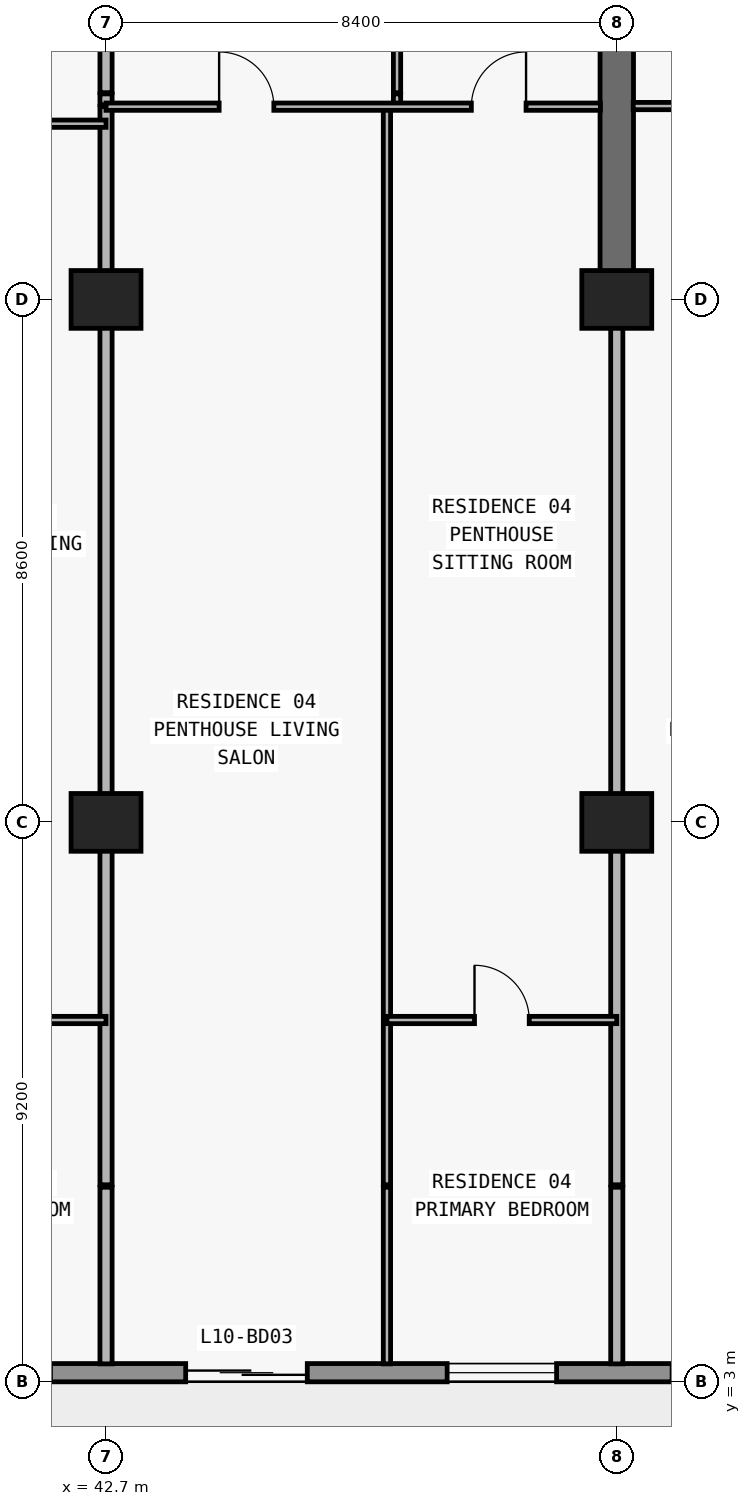
"""IFC4 building model, lengths in metres.
Left out: names, types, materials, properties, quantities, classifications, styles, units other than length and angle.
Written with IfcOpenShell. Run it as: python <this file> out.ifc"""

import sys

from ifc_helpers import new_model, si_unit, direction, frame, frame_2d, origin, origin_2d, place, context, subcontext, project, spatial, rectangle, extrude, element, fill, save


model = new_model("IFC4")
c1 = context("Model", 3, precision=1e-05, world=origin(), true_north=direction((0.0, 1.0)))
c2 = subcontext(c1, "Body", "Model", "MODEL_VIEW")
j1 = project(units=[si_unit("LENGTHUNIT", "METRE"), si_unit("PLANEANGLEUNIT", "RADIAN")], contexts=[c1])
p1 = place(None, origin())
s1 = spatial("IfcSite", under=j1, at=p1, CompositionType="ELEMENT")
p2 = place(p1, origin())
s2 = spatial("IfcBuilding", under=s1, at=p2, CompositionType="ELEMENT")
p3 = place(p2, frame((0.0, 0.0, 43.2)))
s3 = spatial("IfcBuildingStorey", under=s2, at=p3, CompositionType="ELEMENT", Elevation=43.2)
for number, where, z_axis, x_axis in (
    (1, (42.7, 12.2, 0.0), (0.0, 0.0, 1.0), (1.0, 0.0, 0.0)),
    (2, (51.1, 12.2, 0.0), (0.0, 0.0, 1.0), (1.0, 0.0, 0.0)),
    (3, (42.7, 20.8, 0.0), (0.0, 0.0, 1.0), (1.0, 0.0, 0.0)),
    (4, (51.1, 20.8, 0.0), (0.0, 0.0, 1.0), (1.0, 0.0, 0.0)),
):
    element("IfcColumn", number, at=place(p3, frame(where, z_axis=z_axis, x_axis=x_axis)), inside=s3, PredefinedType="COLUMN", context=c2, shape_type="SweptSolid", body=[
        extrude(rectangle(XDim=1.15, YDim=0.95, at=origin_2d()), origin(), (0.0, 0.0, 1.0), 3.05),
    ])
p4 = place(p3, frame((51.1, 20.8, 0.0), z_axis=(0.0, 0.0, 1.0), x_axis=(0.0, 1.0, 0.0)))
e5 = element("IfcWall", 5, at=p4, inside=s3, PredefinedType="SHEAR", context=c2, shape_type="SweptSolid", body=[
    extrude(rectangle(XDim=8.6, YDim=0.55, at=frame_2d((4.3, 0.0))), origin(), (0.0, 0.0, 1.0), 3.05),
])
p5 = place(p3, frame((72.7, 3.15, 0.0), z_axis=(0.0, 0.0, 1.0), x_axis=(-1.0, 0.0, 0.0)))
e6 = element("IfcWall", 6, at=p5, inside=s3, PredefinedType="STANDARD", context=c2, shape_type="SweptSolid", body=[
    extrude(rectangle(XDim=67.6, YDim=0.3, at=frame_2d((33.8, 0.0))), origin(), (0.0, 0.0, 1.0), 3.05),
])
p6 = place(p5, frame((59.89, 0.0, 0.0)))
e7 = element("IfcOpeningElement", 7, at=p6, cuts=e6, PredefinedType="OPENING", context=c2, shape_type="SweptSolid", body=[
    extrude(rectangle(XDim=2.0, YDim=2.3, at=frame_2d((1.0, 1.15))), frame((0.0, 0.16, 0.0), z_axis=(0.0, -1.0, 0.0), x_axis=(1.0, 0.0, 0.0)), (0.0, 0.0, 1.0), 0.32),
])
p7 = place(p5, frame((55.21, 0.0, 0.65)))
e8 = element("IfcOpeningElement", 8, at=p7, cuts=e6, PredefinedType="OPENING", context=c2, shape_type="SweptSolid", body=[
    extrude(rectangle(XDim=2.6, YDim=1.85, at=frame_2d((1.3, 0.925))), frame((0.0, 0.16, 0.0), z_axis=(0.0, -1.0, 0.0), x_axis=(1.0, 0.0, 0.0)), (0.0, 0.0, 1.0), 0.32),
])
p8 = place(p5, frame((49.1, 0.0, 0.85)))
e9 = element("IfcOpeningElement", 9, at=p8, cuts=e6, PredefinedType="OPENING", context=c2, shape_type="SweptSolid", body=[
    extrude(rectangle(XDim=2.2, YDim=1.55, at=frame_2d((1.1, 0.775))), frame((0.0, 0.16, 0.0), z_axis=(0.0, -1.0, 0.0), x_axis=(1.0, 0.0, 0.0)), (0.0, 0.0, 1.0), 0.32),
])
p9 = place(p5, frame((42.69, 0.0, 0.0)))
e10 = element("IfcOpeningElement", 10, at=p9, cuts=e6, PredefinedType="OPENING", context=c2, shape_type="SweptSolid", body=[
    extrude(rectangle(XDim=2.0, YDim=2.3, at=frame_2d((1.0, 1.15))), frame((0.0, 0.16, 0.0), z_axis=(0.0, -1.0, 0.0), x_axis=(1.0, 0.0, 0.0)), (0.0, 0.0, 1.0), 0.32),
])
p10 = place(p5, frame((38.59, 0.0, 0.85)))
e11 = element("IfcOpeningElement", 11, at=p10, cuts=e6, PredefinedType="OPENING", context=c2, shape_type="SweptSolid", body=[
    extrude(rectangle(XDim=1.8, YDim=1.55, at=frame_2d((0.9, 0.775))), frame((0.0, 0.16, 0.0), z_axis=(0.0, -1.0, 0.0), x_axis=(1.0, 0.0, 0.0)), (0.0, 0.0, 1.0), 0.32),
])
p11 = place(p5, frame((30.914, 0.0, 0.85)))
e12 = element("IfcOpeningElement", 12, at=p11, cuts=e6, PredefinedType="OPENING", context=c2, shape_type="SweptSolid", body=[
    extrude(rectangle(XDim=2.2, YDim=1.55, at=frame_2d((1.1, 0.775))), frame((0.0, 0.16, 0.0), z_axis=(0.0, -1.0, 0.0), x_axis=(1.0, 0.0, 0.0)), (0.0, 0.0, 1.0), 0.32),
])
p12 = place(p5, frame((26.69, 0.0, 0.0)))
e13 = element("IfcOpeningElement", 13, at=p12, cuts=e6, PredefinedType="OPENING", context=c2, shape_type="SweptSolid", body=[
    extrude(rectangle(XDim=2.0, YDim=2.3, at=frame_2d((1.0, 1.15))), frame((0.0, 0.16, 0.0), z_axis=(0.0, -1.0, 0.0), x_axis=(1.0, 0.0, 0.0)), (0.0, 0.0, 1.0), 0.32),
])
p13 = place(p5, frame((22.59, 0.0, 0.85)))
e14 = element("IfcOpeningElement", 14, at=p13, cuts=e6, PredefinedType="OPENING", context=c2, shape_type="SweptSolid", body=[
    extrude(rectangle(XDim=1.8, YDim=1.55, at=frame_2d((0.9, 0.775))), frame((0.0, 0.16, 0.0), z_axis=(0.0, -1.0, 0.0), x_axis=(1.0, 0.0, 0.0)), (0.0, 0.0, 1.0), 0.32),
])
p14 = place(p5, frame((18.69, 0.0, 0.0)))
e15 = element("IfcOpeningElement", 15, at=p14, cuts=e6, PredefinedType="OPENING", context=c2, shape_type="SweptSolid", body=[
    extrude(rectangle(XDim=2.0, YDim=2.3, at=frame_2d((1.0, 1.15))), frame((0.0, 0.16, 0.0), z_axis=(0.0, -1.0, 0.0), x_axis=(1.0, 0.0, 0.0)), (0.0, 0.0, 1.0), 0.32),
])
p15 = place(p5, frame((14.01, 0.0, 0.65)))
e16 = element("IfcOpeningElement", 16, at=p15, cuts=e6, PredefinedType="OPENING", context=c2, shape_type="SweptSolid", body=[
    extrude(rectangle(XDim=2.6, YDim=1.85, at=frame_2d((1.3, 0.925))), frame((0.0, 0.16, 0.0), z_axis=(0.0, -1.0, 0.0), x_axis=(1.0, 0.0, 0.0)), (0.0, 0.0, 1.0), 0.32),
])
p16 = place(p5, frame((7.9, 0.0, 0.85)))
e17 = element("IfcOpeningElement", 17, at=p16, cuts=e6, PredefinedType="OPENING", context=c2, shape_type="SweptSolid", body=[
    extrude(rectangle(XDim=2.2, YDim=1.55, at=frame_2d((1.1, 0.775))), frame((0.0, 0.16, 0.0), z_axis=(0.0, -1.0, 0.0), x_axis=(1.0, 0.0, 0.0)), (0.0, 0.0, 1.0), 0.32),
])
p17 = place(p3, frame((42.7, 3.295, 0.0), z_axis=(0.0, 0.0, 1.0), x_axis=(0.0, 1.0, 0.0)))
e18 = element("IfcWall", 18, at=p17, inside=s3, PredefinedType="PARTITIONING", context=c2, shape_type="SweptSolid", body=[
    extrude(rectangle(XDim=2.905, YDim=0.2, at=frame_2d((1.453, 0.0))), origin(), (0.0, 0.0, 1.0), 3.05),
])
p18 = place(p3, frame((42.7, 6.24, 0.0), z_axis=(0.0, 0.0, 1.0), x_axis=(0.0, 1.0, 0.0)))
e19 = element("IfcWall", 19, at=p18, inside=s3, PredefinedType="PARTITIONING", context=c2, shape_type="SweptSolid", body=[
    extrude(rectangle(XDim=17.73, YDim=0.2, at=frame_2d((8.865, 0.0))), origin(), (0.0, 0.0, 1.0), 2.11),
])
p19 = place(p3, frame((42.7, 24.0, 0.0), z_axis=(0.0, 0.0, 1.0), x_axis=(0.0, 1.0, 0.0)))
e20 = element("IfcWall", 20, at=p19, inside=s3, PredefinedType="PARTITIONING", context=c2, shape_type="SweptSolid", body=[
    extrude(rectangle(XDim=0.18, YDim=0.2, at=frame_2d((0.09, 0.0))), origin(), (0.0, 0.0, 1.0), 2.11),
])
p20 = place(p3, frame((42.7, 24.2, 0.0), z_axis=(0.0, 0.0, 1.0), x_axis=(0.0, 1.0, 0.0)))
e21 = element("IfcWall", 21, at=p20, inside=s3, PredefinedType="PARTITIONING", context=c2, shape_type="SweptSolid", body=[
    extrude(rectangle(XDim=4.38, YDim=0.2, at=frame_2d((2.19, 0.0))), origin(), (0.0, 0.0, 1.0), 2.11),
])
p21 = place(p3, frame((47.32, 3.295, 0.0), z_axis=(0.0, 0.0, 1.0), x_axis=(0.0, 1.0, 0.0)))
e22 = element("IfcWall", 22, at=p21, inside=s3, PredefinedType="PARTITIONING", context=c2, shape_type="SweptSolid", body=[
    extrude(rectangle(XDim=2.905, YDim=0.12, at=frame_2d((1.453, 0.0))), origin(), (0.0, 0.0, 1.0), 3.05),
])
p22 = place(p3, frame((47.32, 6.24, 0.0), z_axis=(0.0, 0.0, 1.0), x_axis=(0.0, 1.0, 0.0)))
e23 = element("IfcWall", 23, at=p22, inside=s3, PredefinedType="PARTITIONING", context=c2, shape_type="SweptSolid", body=[
    extrude(rectangle(XDim=17.73, YDim=0.12, at=frame_2d((8.865, 0.0))), origin(), (0.0, 0.0, 1.0), 3.05),
])
p23 = place(p3, frame((47.486, 24.0, 0.0), z_axis=(0.0, 0.0, 1.0), x_axis=(0.0, 1.0, 0.0)))
e24 = element("IfcWall", 24, at=p23, inside=s3, PredefinedType="PARTITIONING", context=c2, shape_type="SweptSolid", body=[
    extrude(rectangle(XDim=0.18, YDim=0.12, at=frame_2d((0.09, 0.0))), origin(), (0.0, 0.0, 1.0), 3.05),
])
p24 = place(p3, frame((47.486, 24.2, 0.0), z_axis=(0.0, 0.0, 1.0), x_axis=(0.0, 1.0, 0.0)))
e25 = element("IfcWall", 25, at=p24, inside=s3, PredefinedType="PARTITIONING", context=c2, shape_type="SweptSolid", body=[
    extrude(rectangle(XDim=4.38, YDim=0.12, at=frame_2d((2.19, 0.0))), origin(), (0.0, 0.0, 1.0), 3.05),
])
p25 = place(p24, frame((1.74, 0.0, 0.0)))
e26 = element("IfcOpeningElement", 26, at=p25, cuts=e25, PredefinedType="OPENING", context=c2, shape_type="SweptSolid", body=[
    extrude(rectangle(XDim=0.9, YDim=2.15, at=frame_2d((0.45, 1.075))), frame((0.0, 0.07, 0.0), z_axis=(0.0, -1.0, 0.0), x_axis=(1.0, 0.0, 0.0)), (0.0, 0.0, 1.0), 0.14),
])
p26 = place(p3, frame((51.1, 3.295, 0.0), z_axis=(0.0, 0.0, 1.0), x_axis=(0.0, 1.0, 0.0)))
e27 = element("IfcWall", 27, at=p26, inside=s3, PredefinedType="PARTITIONING", context=c2, shape_type="SweptSolid", body=[
    extrude(rectangle(XDim=2.905, YDim=0.2, at=frame_2d((1.453, 0.0))), origin(), (0.0, 0.0, 1.0), 3.05),
])
p27 = place(p3, frame((51.1, 6.24, 0.0), z_axis=(0.0, 0.0, 1.0), x_axis=(0.0, 1.0, 0.0)))
e28 = element("IfcWall", 28, at=p27, inside=s3, PredefinedType="PARTITIONING", context=c2, shape_type="SweptSolid", body=[
    extrude(rectangle(XDim=14.555, YDim=0.2, at=frame_2d((7.277, 0.0))), origin(), (0.0, 0.0, 1.0), 2.11),
])
p28 = place(p3, frame((38.672, 8.95, 0.0), z_axis=(0.0, 0.0, 1.0), x_axis=(1.0, 0.0, 0.0)))
e29 = element("IfcWall", 29, at=p28, inside=s3, PredefinedType="PARTITIONING", context=c2, shape_type="SweptSolid", body=[
    extrude(rectangle(XDim=4.028, YDim=0.12, at=frame_2d((2.014, 0.0))), origin(), (0.0, 0.0, 1.0), 3.05),
])
p29 = place(p28, frame((1.564, 0.0, 0.0)))
e30 = element("IfcOpeningElement", 30, at=p29, cuts=e29, PredefinedType="OPENING", context=c2, shape_type="SweptSolid", body=[
    extrude(rectangle(XDim=0.9, YDim=2.15, at=frame_2d((0.45, 1.075))), frame((0.0, 0.07, 0.0), z_axis=(0.0, -1.0, 0.0), x_axis=(1.0, 0.0, 0.0)), (0.0, 0.0, 1.0), 0.14),
])
p30 = place(p3, frame((47.32, 8.95, 0.0), z_axis=(0.0, 0.0, 1.0), x_axis=(1.0, 0.0, 0.0)))
e31 = element("IfcWall", 31, at=p30, inside=s3, PredefinedType="PARTITIONING", context=c2, shape_type="SweptSolid", body=[
    extrude(rectangle(XDim=3.78, YDim=0.12, at=frame_2d((1.89, 0.0))), origin(), (0.0, 0.0, 1.0), 3.05),
])
p31 = place(p30, frame((1.44, 0.0, 0.0)))
e32 = element("IfcOpeningElement", 32, at=p31, cuts=e31, PredefinedType="OPENING", context=c2, shape_type="SweptSolid", body=[
    extrude(rectangle(XDim=0.9, YDim=2.15, at=frame_2d((0.45, 1.075))), frame((0.0, 0.07, 0.0), z_axis=(0.0, -1.0, 0.0), x_axis=(1.0, 0.0, 0.0)), (0.0, 0.0, 1.0), 0.14),
])
p32 = place(p3, frame((35.1, 23.69, 0.0), z_axis=(0.0, 0.0, 1.0), x_axis=(1.0, 0.0, 0.0)))
e33 = element("IfcWall", 33, at=p32, inside=s3, PredefinedType="PARTITIONING", context=c2, shape_type="SweptSolid", body=[
    extrude(rectangle(XDim=7.6, YDim=0.12, at=frame_2d((3.8, 0.0))), origin(), (0.0, 0.0, 1.0), 3.05),
])
p33 = place(p32, frame((1.336, 0.0, 0.0)))
e34 = element("IfcOpeningElement", 34, at=p33, cuts=e33, PredefinedType="OPENING", context=c2, shape_type="SweptSolid", body=[
    extrude(rectangle(XDim=0.9, YDim=2.15, at=frame_2d((0.45, 1.075))), frame((0.0, 0.07, 0.0), z_axis=(0.0, -1.0, 0.0), x_axis=(1.0, 0.0, 0.0)), (0.0, 0.0, 1.0), 0.14),
])
p34 = place(p32, frame((5.402, 0.0, 0.0)))
e35 = element("IfcOpeningElement", 35, at=p34, cuts=e33, PredefinedType="OPENING", context=c2, shape_type="SweptSolid", body=[
    extrude(rectangle(XDim=0.9, YDim=2.15, at=frame_2d((0.45, 1.075))), frame((0.0, 0.07, 0.0), z_axis=(0.0, -1.0, 0.0), x_axis=(1.0, 0.0, 0.0)), (0.0, 0.0, 1.0), 0.14),
])
p35 = place(p3, frame((42.7, 23.97, 0.0), z_axis=(0.0, 0.0, 1.0), x_axis=(1.0, 0.0, 0.0)))
e36 = element("IfcWall", 36, at=p35, inside=s3, PredefinedType="PARTITIONING", context=c2, shape_type="SweptSolid", body=[
    extrude(rectangle(XDim=8.13, YDim=0.12, at=frame_2d((4.065, 0.0))), origin(), (0.0, 0.0, 1.0), 3.05),
])
p36 = place(p35, frame((1.86, 0.0, 0.0)))
e37 = element("IfcOpeningElement", 37, at=p36, cuts=e36, PredefinedType="OPENING", context=c2, shape_type="SweptSolid", body=[
    extrude(rectangle(XDim=0.9, YDim=2.15, at=frame_2d((0.45, 1.075))), frame((0.0, 0.07, 0.0), z_axis=(0.0, -1.0, 0.0), x_axis=(1.0, 0.0, 0.0)), (0.0, 0.0, 1.0), 0.14),
])
p37 = place(p35, frame((6.008, 0.0, 0.0)))
e38 = element("IfcOpeningElement", 38, at=p37, cuts=e36, PredefinedType="OPENING", context=c2, shape_type="SweptSolid", body=[
    extrude(rectangle(XDim=0.9, YDim=2.15, at=frame_2d((0.45, 1.075))), frame((0.0, 0.07, 0.0), z_axis=(0.0, -1.0, 0.0), x_axis=(1.0, 0.0, 0.0)), (0.0, 0.0, 1.0), 0.14),
])
p38 = place(p3, frame((51.37, 23.98, 0.0), z_axis=(0.0, 0.0, 1.0), x_axis=(1.0, 0.0, 0.0)))
e39 = element("IfcWall", 39, at=p38, inside=s3, PredefinedType="PARTITIONING", context=c2, shape_type="SweptSolid", body=[
    extrude(rectangle(XDim=8.13, YDim=0.12, at=frame_2d((4.065, 0.0))), origin(), (0.0, 0.0, 1.0), 3.05),
])
p39 = place(p38, frame((1.305, 0.0, 0.0)))
e40 = element("IfcOpeningElement", 40, at=p39, cuts=e39, PredefinedType="OPENING", context=c2, shape_type="SweptSolid", body=[
    extrude(rectangle(XDim=0.9, YDim=2.15, at=frame_2d((0.45, 1.075))), frame((0.0, 0.07, 0.0), z_axis=(0.0, -1.0, 0.0), x_axis=(1.0, 0.0, 0.0)), (0.0, 0.0, 1.0), 0.14),
])
p40 = place(p12, origin())
e41 = element("IfcDoor", 41, at=p40, inside=s3, OperationType="DOUBLE_DOOR_SLIDING", PredefinedType="DOOR", context=c2, shape_type="SweptSolid", body=[
    extrude(rectangle(XDim=2.0, YDim=2.3, at=frame_2d((1.0, 1.15))), frame((0.0, 0.025, 0.0), z_axis=(0.0, -1.0, 0.0), x_axis=(1.0, 0.0, 0.0)), (0.0, 0.0, 1.0), 0.05),
])
fill(e13, e41)
p41 = place(p13, origin())
e42 = element("IfcWindow", 42, at=p41, inside=s3, PartitioningType="SINGLE_PANEL", PredefinedType="WINDOW", context=c2, shape_type="SweptSolid", body=[
    extrude(rectangle(XDim=1.8, YDim=1.55, at=frame_2d((0.9, 0.775))), frame((0.0, 0.03, 0.0), z_axis=(0.0, -1.0, 0.0), x_axis=(1.0, 0.0, 0.0)), (0.0, 0.0, 1.0), 0.06),
])
fill(e14, e42)
p42 = place(p36, origin())
e43 = element("IfcDoor", 43, at=p42, inside=s3, OperationType="SINGLE_SWING_LEFT", PredefinedType="DOOR", context=c2, shape_type="SweptSolid", body=[
    extrude(rectangle(XDim=0.9, YDim=2.15, at=frame_2d((0.45, 1.075))), frame((0.0, 0.025, 0.0), z_axis=(0.0, -1.0, 0.0), x_axis=(1.0, 0.0, 0.0)), (0.0, 0.0, 1.0), 0.05),
])
fill(e37, e43)
p43 = place(p37, origin())
e44 = element("IfcDoor", 44, at=p43, inside=s3, OperationType="SINGLE_SWING_RIGHT", PredefinedType="DOOR", context=c2, shape_type="SweptSolid", body=[
    extrude(rectangle(XDim=0.9, YDim=2.15, at=frame_2d((0.45, 1.075))), frame((0.0, 0.025, 0.0), z_axis=(0.0, -1.0, 0.0), x_axis=(1.0, 0.0, 0.0)), (0.0, 0.0, 1.0), 0.05),
])
fill(e38, e44)
p44 = place(p31, origin())
e45 = element("IfcDoor", 45, at=p44, inside=s3, OperationType="SINGLE_SWING_LEFT", PredefinedType="DOOR", context=c2, shape_type="SweptSolid", body=[
    extrude(rectangle(XDim=0.9, YDim=2.15, at=frame_2d((0.45, 1.075))), frame((0.0, 0.025, 0.0), z_axis=(0.0, -1.0, 0.0), x_axis=(1.0, 0.0, 0.0)), (0.0, 0.0, 1.0), 0.05),
])
fill(e32, e45)
save(model, sys.argv[1])
